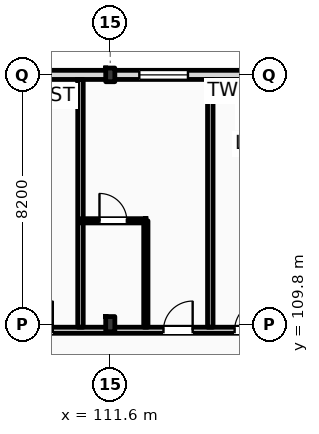
"""IFC4 building model, lengths in metres.
Left out: names, types, materials, properties, quantities, classifications, styles, units other than length and angle.
Written with IfcOpenShell. Run it as: python <this file> out.ifc"""

import sys

from ifc_helpers import new_model, si_unit, direction, frame, frame_2d, origin, origin_2d, place, context, subcontext, project, spatial, rectangle, i_section, extrude, element, fill, save


model = new_model("IFC4")
c1 = context("Model", 3, precision=1e-05, world=origin(), true_north=direction((0.0, 1.0)))
c2 = subcontext(c1, "Body", "Model", "MODEL_VIEW")
j1 = project(units=[si_unit("LENGTHUNIT", "METRE"), si_unit("PLANEANGLEUNIT", "RADIAN")], contexts=[c1])
p1 = place(None, origin())
s1 = spatial("IfcSite", under=j1, at=p1, CompositionType="ELEMENT")
p2 = place(p1, origin())
s2 = spatial("IfcBuilding", under=s1, at=p2, CompositionType="ELEMENT")
p3 = place(p2, frame((0.0, 0.0, 31.8)))
s3 = spatial("IfcBuildingStorey", under=s2, at=p3, CompositionType="ELEMENT", Elevation=31.8)
p4 = place(p3, frame((111.6, 109.8, 0.0), z_axis=(0.0, 0.0, 1.0), x_axis=(1.0, 0.0, 0.0)))
e1 = element("IfcColumn", 1, at=p4, inside=s3, PredefinedType="COLUMN", context=c2, shape_type="SweptSolid", body=[
    extrude(i_section(OverallWidth=0.3, OverallDepth=0.5, WebThickness=0.014, FlangeThickness=0.028, FilletRadius=0.027, at=origin_2d()), origin(), (0.0, 0.0, 1.0), 3.6),
])
p5 = place(p3, frame((111.6, 118.0, 0.0), z_axis=(0.0, 0.0, 1.0), x_axis=(1.0, 0.0, 0.0)))
e2 = element("IfcColumn", 2, at=p5, inside=s3, PredefinedType="COLUMN", context=c2, shape_type="SweptSolid", body=[
    extrude(i_section(OverallWidth=0.3, OverallDepth=0.45, WebThickness=0.014, FlangeThickness=0.026, FilletRadius=0.027, at=origin_2d()), origin(), (0.0, 0.0, 1.0), 3.6),
])
p6 = place(p3, frame((22.5, 118.0, 0.0), z_axis=(0.0, 0.0, 1.0), x_axis=(1.0, 0.0, 0.0)))
e3 = element("IfcWall", 3, at=p6, inside=s3, PredefinedType="STANDARD", context=c2, shape_type="SweptSolid", body=[
    extrude(rectangle(XDim=97.5, YDim=0.3, at=frame_2d((48.75, 0.0))), origin(), (0.0, 0.0, 1.0), 2.72),
])
p7 = place(p6, frame((3.61, 0.0, 0.9)))
e4 = element("IfcOpeningElement", 4, at=p7, cuts=e3, PredefinedType="OPENING", context=c2, shape_type="SweptSolid", body=[
    extrude(rectangle(XDim=1.1, YDim=1.64, at=frame_2d((0.55, 0.82))), frame((0.0, 0.16, 0.0), z_axis=(0.0, -1.0, 0.0), x_axis=(1.0, 0.0, 0.0)), (0.0, 0.0, 1.0), 0.32),
])
p8 = place(p6, frame((6.855, 0.0, 0.0)))
e5 = element("IfcOpeningElement", 5, at=p8, cuts=e3, PredefinedType="OPENING", context=c2, shape_type="SweptSolid", body=[
    extrude(rectangle(XDim=1.2, YDim=2.25, at=frame_2d((0.6, 1.125))), frame((0.0, 0.16, 0.0), z_axis=(0.0, -1.0, 0.0), x_axis=(1.0, 0.0, 0.0)), (0.0, 0.0, 1.0), 0.32),
])
p9 = place(p6, frame((11.405, 0.0, 0.9)))
e6 = element("IfcOpeningElement", 6, at=p9, cuts=e3, PredefinedType="OPENING", context=c2, shape_type="SweptSolid", body=[
    extrude(rectangle(XDim=2.1, YDim=1.64, at=frame_2d((1.05, 0.82))), frame((0.0, 0.16, 0.0), z_axis=(0.0, -1.0, 0.0), x_axis=(1.0, 0.0, 0.0)), (0.0, 0.0, 1.0), 0.32),
])
p10 = place(p6, frame((15.13, 0.0, 0.9)))
e7 = element("IfcOpeningElement", 7, at=p10, cuts=e3, PredefinedType="OPENING", context=c2, shape_type="SweptSolid", body=[
    extrude(rectangle(XDim=2.25, YDim=1.64, at=frame_2d((1.125, 0.82))), frame((0.0, 0.16, 0.0), z_axis=(0.0, -1.0, 0.0), x_axis=(1.0, 0.0, 0.0)), (0.0, 0.0, 1.0), 0.32),
])
p11 = place(p6, frame((21.53, 0.0, 0.0)))
e8 = element("IfcOpeningElement", 8, at=p11, cuts=e3, PredefinedType="OPENING", context=c2, shape_type="SweptSolid", body=[
    extrude(rectangle(XDim=1.2, YDim=2.25, at=frame_2d((0.6, 1.125))), frame((0.0, 0.16, 0.0), z_axis=(0.0, -1.0, 0.0), x_axis=(1.0, 0.0, 0.0)), (0.0, 0.0, 1.0), 0.32),
])
p12 = place(p6, frame((24.18, 0.0, 0.9)))
e9 = element("IfcOpeningElement", 9, at=p12, cuts=e3, PredefinedType="OPENING", context=c2, shape_type="SweptSolid", body=[
    extrude(rectangle(XDim=1.1, YDim=1.64, at=frame_2d((0.55, 0.82))), frame((0.0, 0.16, 0.0), z_axis=(0.0, -1.0, 0.0), x_axis=(1.0, 0.0, 0.0)), (0.0, 0.0, 1.0), 0.32),
])
p13 = place(p6, frame((29.105, 0.0, 0.9)))
e10 = element("IfcOpeningElement", 10, at=p13, cuts=e3, PredefinedType="OPENING", context=c2, shape_type="SweptSolid", body=[
    extrude(rectangle(XDim=2.7, YDim=1.64, at=frame_2d((1.35, 0.82))), frame((0.0, 0.16, 0.0), z_axis=(0.0, -1.0, 0.0), x_axis=(1.0, 0.0, 0.0)), (0.0, 0.0, 1.0), 0.32),
])
p14 = place(p6, frame((34.83, 0.0, 0.9)))
e11 = element("IfcOpeningElement", 11, at=p14, cuts=e3, PredefinedType="OPENING", context=c2, shape_type="SweptSolid", body=[
    extrude(rectangle(XDim=1.8, YDim=1.64, at=frame_2d((0.9, 0.82))), frame((0.0, 0.16, 0.0), z_axis=(0.0, -1.0, 0.0), x_axis=(1.0, 0.0, 0.0)), (0.0, 0.0, 1.0), 0.32),
])
p15 = place(p6, frame((38.525, 0.0, 0.0)))
e12 = element("IfcOpeningElement", 12, at=p15, cuts=e3, PredefinedType="OPENING", context=c2, shape_type="SweptSolid", body=[
    extrude(rectangle(XDim=1.2, YDim=2.25, at=frame_2d((0.6, 1.125))), frame((0.0, 0.16, 0.0), z_axis=(0.0, -1.0, 0.0), x_axis=(1.0, 0.0, 0.0)), (0.0, 0.0, 1.0), 0.32),
])
p16 = place(p6, frame((42.73, 0.0, 0.9)))
e13 = element("IfcOpeningElement", 13, at=p16, cuts=e3, PredefinedType="OPENING", context=c2, shape_type="SweptSolid", body=[
    extrude(rectangle(XDim=3.05, YDim=1.64, at=frame_2d((1.525, 0.82))), frame((0.0, 0.16, 0.0), z_axis=(0.0, -1.0, 0.0), x_axis=(1.0, 0.0, 0.0)), (0.0, 0.0, 1.0), 0.32),
])
p17 = place(p6, frame((47.155, 0.0, 0.9)))
e14 = element("IfcOpeningElement", 14, at=p17, cuts=e3, PredefinedType="OPENING", context=c2, shape_type="SweptSolid", body=[
    extrude(rectangle(XDim=1.35, YDim=1.64, at=frame_2d((0.675, 0.82))), frame((0.0, 0.16, 0.0), z_axis=(0.0, -1.0, 0.0), x_axis=(1.0, 0.0, 0.0)), (0.0, 0.0, 1.0), 0.32),
])
p18 = place(p6, frame((53.065, 0.0, 0.0)))
e15 = element("IfcOpeningElement", 15, at=p18, cuts=e3, PredefinedType="OPENING", context=c2, shape_type="SweptSolid", body=[
    extrude(rectangle(XDim=1.2, YDim=2.25, at=frame_2d((0.6, 1.125))), frame((0.0, 0.16, 0.0), z_axis=(0.0, -1.0, 0.0), x_axis=(1.0, 0.0, 0.0)), (0.0, 0.0, 1.0), 0.32),
])
p19 = place(p6, frame((58.2, 0.0, 0.9)))
e16 = element("IfcOpeningElement", 16, at=p19, cuts=e3, PredefinedType="OPENING", context=c2, shape_type="SweptSolid", body=[
    extrude(rectangle(XDim=1.8, YDim=1.64, at=frame_2d((0.9, 0.82))), frame((0.0, 0.16, 0.0), z_axis=(0.0, -1.0, 0.0), x_axis=(1.0, 0.0, 0.0)), (0.0, 0.0, 1.0), 0.32),
])
p20 = place(p6, frame((61.13, 0.0, 0.9)))
e17 = element("IfcOpeningElement", 17, at=p20, cuts=e3, PredefinedType="OPENING", context=c2, shape_type="SweptSolid", body=[
    extrude(rectangle(XDim=3.05, YDim=1.64, at=frame_2d((1.525, 0.82))), frame((0.0, 0.16, 0.0), z_axis=(0.0, -1.0, 0.0), x_axis=(1.0, 0.0, 0.0)), (0.0, 0.0, 1.0), 0.32),
])
p21 = place(p6, frame((67.93, 0.0, 0.0)))
e18 = element("IfcOpeningElement", 18, at=p21, cuts=e3, PredefinedType="OPENING", context=c2, shape_type="SweptSolid", body=[
    extrude(rectangle(XDim=1.2, YDim=2.25, at=frame_2d((0.6, 1.125))), frame((0.0, 0.16, 0.0), z_axis=(0.0, -1.0, 0.0), x_axis=(1.0, 0.0, 0.0)), (0.0, 0.0, 1.0), 0.32),
])
p22 = place(p6, frame((70.39, 0.0, 0.0)))
e19 = element("IfcOpeningElement", 19, at=p22, cuts=e3, PredefinedType="OPENING", context=c2, shape_type="SweptSolid", body=[
    extrude(rectangle(XDim=1.2, YDim=2.25, at=frame_2d((0.6, 1.125))), frame((0.0, 0.16, 0.0), z_axis=(0.0, -1.0, 0.0), x_axis=(1.0, 0.0, 0.0)), (0.0, 0.0, 1.0), 0.32),
])
p23 = place(p6, frame((75.905, 0.0, 0.9)))
e20 = element("IfcOpeningElement", 20, at=p23, cuts=e3, PredefinedType="OPENING", context=c2, shape_type="SweptSolid", body=[
    extrude(rectangle(XDim=1.1, YDim=1.5, at=frame_2d((0.55, 0.75))), frame((0.0, 0.16, 0.0), z_axis=(0.0, -1.0, 0.0), x_axis=(1.0, 0.0, 0.0)), (0.0, 0.0, 1.0), 0.32),
])
p24 = place(p6, frame((81.63, 0.0, 0.9)))
e21 = element("IfcOpeningElement", 21, at=p24, cuts=e3, PredefinedType="OPENING", context=c2, shape_type="SweptSolid", body=[
    extrude(rectangle(XDim=1.1, YDim=1.6, at=frame_2d((0.55, 0.8))), frame((0.0, 0.16, 0.0), z_axis=(0.0, -1.0, 0.0), x_axis=(1.0, 0.0, 0.0)), (0.0, 0.0, 1.0), 0.32),
])
p25 = place(p6, frame((84.955, 0.0, 0.9)))
e22 = element("IfcOpeningElement", 22, at=p25, cuts=e3, PredefinedType="OPENING", context=c2, shape_type="SweptSolid", body=[
    extrude(rectangle(XDim=1.4, YDim=1.64, at=frame_2d((0.7, 0.82))), frame((0.0, 0.16, 0.0), z_axis=(0.0, -1.0, 0.0), x_axis=(1.0, 0.0, 0.0)), (0.0, 0.0, 1.0), 0.32),
])
p26 = place(p6, frame((90.055, 0.0, 0.9)))
e23 = element("IfcOpeningElement", 23, at=p26, cuts=e3, PredefinedType="OPENING", context=c2, shape_type="SweptSolid", body=[
    extrude(rectangle(XDim=1.6, YDim=1.64, at=frame_2d((0.8, 0.82))), frame((0.0, 0.16, 0.0), z_axis=(0.0, -1.0, 0.0), x_axis=(1.0, 0.0, 0.0)), (0.0, 0.0, 1.0), 0.32),
])
p27 = place(p6, frame((93.87, 0.0, 0.9)))
e24 = element("IfcOpeningElement", 24, at=p27, cuts=e3, PredefinedType="OPENING", context=c2, shape_type="SweptSolid", body=[
    extrude(rectangle(XDim=1.75, YDim=1.64, at=frame_2d((0.875, 0.82))), frame((0.0, 0.16, 0.0), z_axis=(0.0, -1.0, 0.0), x_axis=(1.0, 0.0, 0.0)), (0.0, 0.0, 1.0), 0.32),
])
p28 = place(p3, frame((10.65, 109.6, 0.0), z_axis=(0.0, 0.0, 1.0), x_axis=(1.0, 0.0, 0.0)))
e25 = element("IfcWall", 25, at=p28, inside=s3, PredefinedType="PARTITIONING", context=c2, shape_type="SweptSolid", body=[
    extrude(rectangle(XDim=109.21, YDim=0.2, at=frame_2d((54.605, 0.0))), origin(), (0.0, 0.0, 1.0), 2.72),
])
p29 = place(p28, frame((15.825, 0.0, 0.0)))
e26 = element("IfcOpeningElement", 26, at=p29, cuts=e25, PredefinedType="OPENING", context=c2, shape_type="SweptSolid", body=[
    extrude(rectangle(XDim=1.02, YDim=2.2, at=frame_2d((0.51, 1.1))), frame((0.0, 0.11, 0.0), z_axis=(0.0, -1.0, 0.0), x_axis=(1.0, 0.0, 0.0)), (0.0, 0.0, 1.0), 0.22),
])
p30 = place(p28, frame((19.87, 0.0, 0.0)))
e27 = element("IfcOpeningElement", 27, at=p30, cuts=e25, PredefinedType="OPENING", context=c2, shape_type="SweptSolid", body=[
    extrude(rectangle(XDim=1.02, YDim=2.2, at=frame_2d((0.51, 1.1))), frame((0.0, 0.11, 0.0), z_axis=(0.0, -1.0, 0.0), x_axis=(1.0, 0.0, 0.0)), (0.0, 0.0, 1.0), 0.22),
])
p31 = place(p28, frame((24.47, 0.0, 0.0)))
e28 = element("IfcOpeningElement", 28, at=p31, cuts=e25, PredefinedType="OPENING", context=c2, shape_type="SweptSolid", body=[
    extrude(rectangle(XDim=1.02, YDim=2.2, at=frame_2d((0.51, 1.1))), frame((0.0, 0.11, 0.0), z_axis=(0.0, -1.0, 0.0), x_axis=(1.0, 0.0, 0.0)), (0.0, 0.0, 1.0), 0.22),
])
p32 = place(p28, frame((26.92, 0.0, 0.0)))
e29 = element("IfcOpeningElement", 29, at=p32, cuts=e25, PredefinedType="OPENING", context=c2, shape_type="SweptSolid", body=[
    extrude(rectangle(XDim=1.02, YDim=2.2, at=frame_2d((0.51, 1.1))), frame((0.0, 0.11, 0.0), z_axis=(0.0, -1.0, 0.0), x_axis=(1.0, 0.0, 0.0)), (0.0, 0.0, 1.0), 0.22),
])
p33 = place(p28, frame((33.7, 0.0, 0.0)))
e30 = element("IfcOpeningElement", 30, at=p33, cuts=e25, PredefinedType="OPENING", context=c2, shape_type="SweptSolid", body=[
    extrude(rectangle(XDim=0.96, YDim=2.2, at=frame_2d((0.48, 1.1))), frame((0.0, 0.11, 0.0), z_axis=(0.0, -1.0, 0.0), x_axis=(1.0, 0.0, 0.0)), (0.0, 0.0, 1.0), 0.22),
])
p34 = place(p28, frame((35.9, 0.0, 0.0)))
e31 = element("IfcOpeningElement", 31, at=p34, cuts=e25, PredefinedType="OPENING", context=c2, shape_type="SweptSolid", body=[
    extrude(rectangle(XDim=0.96, YDim=2.2, at=frame_2d((0.48, 1.1))), frame((0.0, 0.11, 0.0), z_axis=(0.0, -1.0, 0.0), x_axis=(1.0, 0.0, 0.0)), (0.0, 0.0, 1.0), 0.22),
])
p35 = place(p28, frame((42.9, 0.0, 0.0)))
e32 = element("IfcOpeningElement", 32, at=p35, cuts=e25, PredefinedType="OPENING", context=c2, shape_type="SweptSolid", body=[
    extrude(rectangle(XDim=0.96, YDim=2.2, at=frame_2d((0.48, 1.1))), frame((0.0, 0.11, 0.0), z_axis=(0.0, -1.0, 0.0), x_axis=(1.0, 0.0, 0.0)), (0.0, 0.0, 1.0), 0.22),
])
p36 = place(p28, frame((47.5, 0.0, 0.0)))
e33 = element("IfcOpeningElement", 33, at=p36, cuts=e25, PredefinedType="OPENING", context=c2, shape_type="SweptSolid", body=[
    extrude(rectangle(XDim=0.96, YDim=2.2, at=frame_2d((0.48, 1.1))), frame((0.0, 0.11, 0.0), z_axis=(0.0, -1.0, 0.0), x_axis=(1.0, 0.0, 0.0)), (0.0, 0.0, 1.0), 0.22),
])
p37 = place(p28, frame((49.95, 0.0, 0.0)))
e34 = element("IfcOpeningElement", 34, at=p37, cuts=e25, PredefinedType="OPENING", context=c2, shape_type="SweptSolid", body=[
    extrude(rectangle(XDim=0.96, YDim=2.2, at=frame_2d((0.48, 1.1))), frame((0.0, 0.11, 0.0), z_axis=(0.0, -1.0, 0.0), x_axis=(1.0, 0.0, 0.0)), (0.0, 0.0, 1.0), 0.22),
])
p38 = place(p28, frame((56.7, 0.0, 0.0)))
e35 = element("IfcOpeningElement", 35, at=p38, cuts=e25, PredefinedType="OPENING", context=c2, shape_type="SweptSolid", body=[
    extrude(rectangle(XDim=0.96, YDim=2.2, at=frame_2d((0.48, 1.1))), frame((0.0, 0.11, 0.0), z_axis=(0.0, -1.0, 0.0), x_axis=(1.0, 0.0, 0.0)), (0.0, 0.0, 1.0), 0.22),
])
p39 = place(p28, frame((59.15, 0.0, 0.0)))
e36 = element("IfcOpeningElement", 36, at=p39, cuts=e25, PredefinedType="OPENING", context=c2, shape_type="SweptSolid", body=[
    extrude(rectangle(XDim=0.96, YDim=2.2, at=frame_2d((0.48, 1.1))), frame((0.0, 0.11, 0.0), z_axis=(0.0, -1.0, 0.0), x_axis=(1.0, 0.0, 0.0)), (0.0, 0.0, 1.0), 0.22),
])
p40 = place(p28, frame((65.9, 0.0, 0.0)))
e37 = element("IfcOpeningElement", 37, at=p40, cuts=e25, PredefinedType="OPENING", context=c2, shape_type="SweptSolid", body=[
    extrude(rectangle(XDim=0.96, YDim=2.2, at=frame_2d((0.48, 1.1))), frame((0.0, 0.11, 0.0), z_axis=(0.0, -1.0, 0.0), x_axis=(1.0, 0.0, 0.0)), (0.0, 0.0, 1.0), 0.22),
])
p41 = place(p28, frame((70.5, 0.0, 0.0)))
e38 = element("IfcOpeningElement", 38, at=p41, cuts=e25, PredefinedType="OPENING", context=c2, shape_type="SweptSolid", body=[
    extrude(rectangle(XDim=0.96, YDim=2.2, at=frame_2d((0.48, 1.1))), frame((0.0, 0.11, 0.0), z_axis=(0.0, -1.0, 0.0), x_axis=(1.0, 0.0, 0.0)), (0.0, 0.0, 1.0), 0.22),
])
p42 = place(p28, frame((72.95, 0.0, 0.0)))
e39 = element("IfcOpeningElement", 39, at=p42, cuts=e25, PredefinedType="OPENING", context=c2, shape_type="SweptSolid", body=[
    extrude(rectangle(XDim=0.96, YDim=2.2, at=frame_2d((0.48, 1.1))), frame((0.0, 0.11, 0.0), z_axis=(0.0, -1.0, 0.0), x_axis=(1.0, 0.0, 0.0)), (0.0, 0.0, 1.0), 0.22),
])
p43 = place(p28, frame((79.7, 0.0, 0.0)))
e40 = element("IfcOpeningElement", 40, at=p43, cuts=e25, PredefinedType="OPENING", context=c2, shape_type="SweptSolid", body=[
    extrude(rectangle(XDim=0.96, YDim=2.2, at=frame_2d((0.48, 1.1))), frame((0.0, 0.11, 0.0), z_axis=(0.0, -1.0, 0.0), x_axis=(1.0, 0.0, 0.0)), (0.0, 0.0, 1.0), 0.22),
])
p44 = place(p28, frame((82.15, 0.0, 0.0)))
e41 = element("IfcOpeningElement", 41, at=p44, cuts=e25, PredefinedType="OPENING", context=c2, shape_type="SweptSolid", body=[
    extrude(rectangle(XDim=0.96, YDim=2.2, at=frame_2d((0.48, 1.1))), frame((0.0, 0.11, 0.0), z_axis=(0.0, -1.0, 0.0), x_axis=(1.0, 0.0, 0.0)), (0.0, 0.0, 1.0), 0.22),
])
p45 = place(p28, frame((88.9, 0.0, 0.0)))
e42 = element("IfcOpeningElement", 42, at=p45, cuts=e25, PredefinedType="OPENING", context=c2, shape_type="SweptSolid", body=[
    extrude(rectangle(XDim=0.96, YDim=2.2, at=frame_2d((0.48, 1.1))), frame((0.0, 0.11, 0.0), z_axis=(0.0, -1.0, 0.0), x_axis=(1.0, 0.0, 0.0)), (0.0, 0.0, 1.0), 0.22),
])
p46 = place(p28, frame((93.75, 0.0, 0.0)))
e43 = element("IfcOpeningElement", 43, at=p46, cuts=e25, PredefinedType="OPENING", context=c2, shape_type="SweptSolid", body=[
    extrude(rectangle(XDim=0.96, YDim=2.2, at=frame_2d((0.48, 1.1))), frame((0.0, 0.11, 0.0), z_axis=(0.0, -1.0, 0.0), x_axis=(1.0, 0.0, 0.0)), (0.0, 0.0, 1.0), 0.22),
])
p47 = place(p28, frame((98.1, 0.0, 0.0)))
e44 = element("IfcOpeningElement", 44, at=p47, cuts=e25, PredefinedType="OPENING", context=c2, shape_type="SweptSolid", body=[
    extrude(rectangle(XDim=0.96, YDim=2.2, at=frame_2d((0.48, 1.1))), frame((0.0, 0.11, 0.0), z_axis=(0.0, -1.0, 0.0), x_axis=(1.0, 0.0, 0.0)), (0.0, 0.0, 1.0), 0.22),
])
p48 = place(p28, frame((102.7, 0.0, 0.0)))
e45 = element("IfcOpeningElement", 45, at=p48, cuts=e25, PredefinedType="OPENING", context=c2, shape_type="SweptSolid", body=[
    extrude(rectangle(XDim=0.96, YDim=2.2, at=frame_2d((0.48, 1.1))), frame((0.0, 0.11, 0.0), z_axis=(0.0, -1.0, 0.0), x_axis=(1.0, 0.0, 0.0)), (0.0, 0.0, 1.0), 0.22),
])
p49 = place(p28, frame((105.04, 0.0, 0.0)))
e46 = element("IfcOpeningElement", 46, at=p49, cuts=e25, PredefinedType="OPENING", context=c2, shape_type="SweptSolid", body=[
    extrude(rectangle(XDim=0.96, YDim=2.2, at=frame_2d((0.48, 1.1))), frame((0.0, 0.11, 0.0), z_axis=(0.0, -1.0, 0.0), x_axis=(1.0, 0.0, 0.0)), (0.0, 0.0, 1.0), 0.22),
])
p50 = place(p28, frame((2.716, 0.0, 0.0)))
e47 = element("IfcOpeningElement", 47, at=p50, cuts=e25, PredefinedType="OPENING", context=c2, shape_type="SweptSolid", body=[
    extrude(rectangle(XDim=1.35, YDim=2.25, at=frame_2d((0.675, 1.125))), frame((0.0, 0.11, 0.0), z_axis=(0.0, -1.0, 0.0), x_axis=(1.0, 0.0, 0.0)), (0.0, 0.0, 1.0), 0.22),
])
p51 = place(p28, frame((6.65, 0.0, 0.0)))
e48 = element("IfcOpeningElement", 48, at=p51, cuts=e25, PredefinedType="OPENING", context=c2, shape_type="SweptSolid", body=[
    extrude(rectangle(XDim=1.35, YDim=2.25, at=frame_2d((0.675, 1.125))), frame((0.0, 0.11, 0.0), z_axis=(0.0, -1.0, 0.0), x_axis=(1.0, 0.0, 0.0)), (0.0, 0.0, 1.0), 0.22),
])
p52 = place(p28, frame((10.583, 0.0, 0.0)))
e49 = element("IfcOpeningElement", 49, at=p52, cuts=e25, PredefinedType="OPENING", context=c2, shape_type="SweptSolid", body=[
    extrude(rectangle(XDim=1.35, YDim=2.25, at=frame_2d((0.675, 1.125))), frame((0.0, 0.11, 0.0), z_axis=(0.0, -1.0, 0.0), x_axis=(1.0, 0.0, 0.0)), (0.0, 0.0, 1.0), 0.22),
])
for number, where, z_axis, x_axis in (
    (50, (110.62, 109.7, 0.0), (0.0, 0.0, 1.0), (0.0, 1.0, 0.0)),
    (51, (114.89, 109.7, 0.0), (0.0, 0.0, 1.0), (0.0, 1.0, 0.0)),
):
    element("IfcWall", number, at=place(p3, frame(where, z_axis=z_axis, x_axis=x_axis)), inside=s3, PredefinedType="PARTITIONING", context=c2, shape_type="SweptSolid", body=[
        extrude(rectangle(XDim=8.15, YDim=0.18, at=frame_2d((4.075, 0.0))), origin(), (0.0, 0.0, 1.0), 3.36),
    ])
p53 = place(p3, frame((112.77, 109.7, 0.0), z_axis=(0.0, 0.0, 1.0), x_axis=(0.0, 1.0, 0.0)))
e52 = element("IfcWall", 52, at=p53, inside=s3, PredefinedType="PARTITIONING", context=c2, shape_type="SweptSolid", body=[
    extrude(rectangle(XDim=3.5, YDim=0.14, at=frame_2d((1.75, 0.0))), origin(), (0.0, 0.0, 1.0), 3.36),
])
p54 = place(p3, frame((110.62, 113.2, 0.0), z_axis=(0.0, 0.0, 1.0), x_axis=(1.0, 0.0, 0.0)))
e53 = element("IfcWall", 53, at=p54, inside=s3, PredefinedType="PARTITIONING", context=c2, shape_type="SweptSolid", body=[
    extrude(rectangle(XDim=2.15, YDim=0.14, at=frame_2d((1.075, 0.0))), origin(), (0.0, 0.0, 1.0), 3.36),
])
p55 = place(p54, frame((0.625, 0.0, 0.0)))
e54 = element("IfcOpeningElement", 54, at=p55, cuts=e53, PredefinedType="OPENING", context=c2, shape_type="SweptSolid", body=[
    extrude(rectangle(XDim=0.9, YDim=2.1, at=frame_2d((0.45, 1.05))), frame((0.0, 0.08, 0.0), z_axis=(0.0, -1.0, 0.0), x_axis=(1.0, 0.0, 0.0)), (0.0, 0.0, 1.0), 0.16),
])
p56 = place(p26, origin())
e55 = element("IfcWindow", 55, at=p56, inside=s3, PartitioningType="DOUBLE_PANEL_VERTICAL", PredefinedType="WINDOW", context=c2, shape_type="SweptSolid", body=[
    extrude(rectangle(XDim=1.6, YDim=1.64, at=frame_2d((0.8, 0.82))), frame((0.0, 0.03, 0.0), z_axis=(0.0, -1.0, 0.0), x_axis=(1.0, 0.0, 0.0)), (0.0, 0.0, 1.0), 0.06),
])
fill(e23, e55)
p57 = place(p47, origin())
e56 = element("IfcDoor", 56, at=p57, inside=s3, OperationType="SINGLE_SWING_RIGHT", PredefinedType="DOOR", context=c2, shape_type="SweptSolid", body=[
    extrude(rectangle(XDim=0.96, YDim=2.2, at=frame_2d((0.48, 1.1))), frame((0.0, 0.025, 0.0), z_axis=(0.0, -1.0, 0.0), x_axis=(1.0, 0.0, 0.0)), (0.0, 0.0, 1.0), 0.05),
])
fill(e44, e56)
p58 = place(p48, origin())
e57 = element("IfcDoor", 57, at=p58, inside=s3, OperationType="SINGLE_SWING_RIGHT", PredefinedType="DOOR", context=c2, shape_type="SweptSolid", body=[
    extrude(rectangle(XDim=0.96, YDim=2.2, at=frame_2d((0.48, 1.1))), frame((0.0, 0.025, 0.0), z_axis=(0.0, -1.0, 0.0), x_axis=(1.0, 0.0, 0.0)), (0.0, 0.0, 1.0), 0.05),
])
fill(e45, e57)
p59 = place(p55, origin())
e58 = element("IfcDoor", 58, at=p59, inside=s3, OperationType="SINGLE_SWING_LEFT", PredefinedType="DOOR", context=c2, shape_type="SweptSolid", body=[
    extrude(rectangle(XDim=0.9, YDim=2.1, at=frame_2d((0.45, 1.05))), frame((0.0, 0.025, 0.0), z_axis=(0.0, -1.0, 0.0), x_axis=(1.0, 0.0, 0.0)), (0.0, 0.0, 1.0), 0.05),
])
fill(e54, e58)
p60 = place(p49, origin())
e59 = element("IfcDoor", 59, at=p60, inside=s3, OperationType="SINGLE_SWING_RIGHT", PredefinedType="DOOR", context=c2, shape_type="SweptSolid", body=[
    extrude(rectangle(XDim=0.96, YDim=2.2, at=frame_2d((0.48, 1.1))), frame((0.0, 0.025, 0.0), z_axis=(0.0, -1.0, 0.0), x_axis=(1.0, 0.0, 0.0)), (0.0, 0.0, 1.0), 0.05),
])
fill(e46, e59)
save(model, sys.argv[1])
